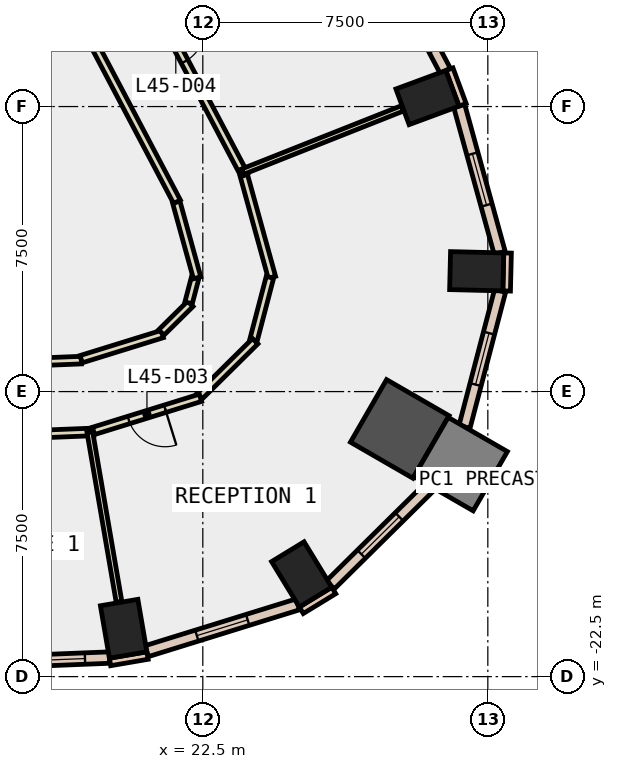
"""IFC4 building model, lengths in metres.
Left out: names, types, materials, properties, quantities, classifications, styles, units other than length and angle.
Written with IfcOpenShell. Run it as: python <this file> out.ifc"""

import sys

from ifc_helpers import new_model, si_unit, direction, frame, frame_2d, origin, origin_2d, place, context, subcontext, project, spatial, rectangle, extrude, element, fill, save


model = new_model("IFC4")
c1 = context("Model", 3, precision=1e-05, world=origin(), true_north=direction((0.0, 1.0)))
c2 = subcontext(c1, "Body", "Model", "MODEL_VIEW")
j1 = project(units=[si_unit("LENGTHUNIT", "METRE"), si_unit("PLANEANGLEUNIT", "RADIAN")], contexts=[c1])
p1 = place(None, origin())
s1 = spatial("IfcSite", under=j1, at=p1, CompositionType="ELEMENT")
p2 = place(p1, origin())
s2 = spatial("IfcBuilding", under=s1, at=p2, CompositionType="ELEMENT")
p3 = place(p2, frame((0.0, 0.0, 202.4)))
s3 = spatial("IfcBuildingStorey", under=s2, at=p3, CompositionType="ELEMENT", Elevation=202.4)
for number, where, z_axis, x_axis in (
    (1, (20.417, -21.241, -0.4), (0.0, 0.0, 1.0), (0.986, 0.169, 0.0)),
    (2, (25.102, -19.811, -0.4), (0.0, 0.0, 1.0), (0.853, 0.521, 0.0)),
):
    element("IfcColumn", number, at=place(p3, frame(where, z_axis=z_axis, x_axis=x_axis)), inside=s3, PredefinedType="COLUMN", context=c2, shape_type="SweptSolid", body=[
        extrude(rectangle(XDim=1.0, YDim=1.4, at=origin_2d()), origin(), (0.0, 0.0, 1.0), 4.2),
    ])
p4 = place(p3, frame((27.683, -15.983, -0.4), z_axis=(0.0, 0.0, 1.0), x_axis=(-0.866025403784, 0.5, 0.0)))
e3 = element("IfcColumn", 3, at=p4, inside=s3, PredefinedType="COLUMN", context=c2, shape_type="SweptSolid", body=[
    extrude(rectangle(XDim=1.9, YDim=1.9, at=origin_2d()), origin(), (0.0, 0.0, 1.0), 4.2),
])
for number, where, z_axis, x_axis in (
    (4, (29.707, -11.834, -0.4), (0.0, 0.0, 1.0), (0.025, 1.0, 0.0)),
    (5, (28.412, -7.264, -0.4), (0.0, 0.0, 1.0), (-0.347, 0.938, 0.0)),
):
    element("IfcColumn", number, at=place(p3, frame(where, z_axis=z_axis, x_axis=x_axis)), inside=s3, PredefinedType="COLUMN", context=c2, shape_type="SweptSolid", body=[
        extrude(rectangle(XDim=1.0, YDim=1.4, at=origin_2d()), origin(), (0.0, 0.0, 1.0), 4.2),
    ])
p5 = place(p3, frame((29.285, -16.908, -0.4), z_axis=(0.0, 0.0, 1.0), x_axis=(-0.866025403784, 0.5, 0.0)))
e6 = element("IfcColumn", 6, at=p5, inside=s3, PredefinedType="COLUMN", context=c2, shape_type="SweptSolid", body=[
    extrude(rectangle(XDim=1.8, YDim=1.8, at=origin_2d()), origin(), (0.0, 0.0, 1.0), 4.2),
])
p6 = place(p3, frame((29.336, -7.456, 0.0), z_axis=(0.0, 0.0, 1.0), x_axis=(-0.346892928577, 0.937904737222, 0.0)))
e7 = element("IfcWall", 7, at=p6, inside=s3, PredefinedType="STANDARD", context=c2, shape_type="SweptSolid", body=[
    extrude(rectangle(XDim=1.0, YDim=0.2, at=frame_2d((0.5, 0.0))), origin(), (0.0, 0.0, 1.0), 3.8),
])
p7 = place(p3, frame((20.059, -22.114, 0.0), z_axis=(0.0, 0.0, 1.0), x_axis=(0.985631544579, 0.168909615862, 0.0)))
e8 = element("IfcWall", 8, at=p7, inside=s3, PredefinedType="STANDARD", context=c2, shape_type="SweptSolid", body=[
    extrude(rectangle(XDim=1.0, YDim=0.2, at=frame_2d((0.5, 0.0))), origin(), (0.0, 0.0, 1.0), 3.8),
])
p8 = place(p3, frame((25.092, -20.754, 0.0), z_axis=(0.0, 0.0, 1.0), x_axis=(0.853679739553, 0.520798331677, 0.0)))
e9 = element("IfcWall", 9, at=p8, inside=s3, PredefinedType="STANDARD", context=c2, shape_type="SweptSolid", body=[
    extrude(rectangle(XDim=1.0, YDim=0.2, at=frame_2d((0.5, 0.0))), origin(), (0.0, 0.0, 1.0), 3.8),
])
p9 = place(p3, frame((30.495, -12.353, 0.0), z_axis=(0.0, 0.0, 1.0), x_axis=(0.023942303888, 0.999713341956, 0.0)))
e10 = element("IfcWall", 10, at=p9, inside=s3, PredefinedType="STANDARD", context=c2, shape_type="SweptSolid", body=[
    extrude(rectangle(XDim=0.999, YDim=0.2, at=frame_2d((0.5, 0.0))), origin(), (0.0, 0.0, 1.0), 3.8),
])
p10 = place(p3, frame((14.679, -22.213, 0.0), z_axis=(0.0, 0.0, 1.0), x_axis=(0.999205241612, 0.039860822062, 0.0)))
e11 = element("IfcWall", 11, at=p10, inside=s3, PredefinedType="STANDARD", context=c2, shape_type="SweptSolid", body=[
    extrude(rectangle(XDim=5.365, YDim=0.3, at=frame_2d((2.683, 0.0))), origin(), (0.0, 0.0, 1.0), 3.8),
])
p11 = place(p10, frame((0.641, 0.0, 0.9)))
e12 = element("IfcOpeningElement", 12, at=p11, cuts=e11, PredefinedType="OPENING", context=c2, shape_type="SweptSolid", body=[
    extrude(rectangle(XDim=1.4, YDim=2.6, at=frame_2d((0.7, 1.3))), frame((0.0, 0.16, 0.0), z_axis=(0.0, -1.0, 0.0), x_axis=(1.0, 0.0, 0.0)), (0.0, 0.0, 1.0), 0.32),
])
p12 = place(p10, frame((3.324, 0.0, 0.9)))
e13 = element("IfcOpeningElement", 13, at=p12, cuts=e11, PredefinedType="OPENING", context=c2, shape_type="SweptSolid", body=[
    extrude(rectangle(XDim=1.4, YDim=2.6, at=frame_2d((0.7, 1.3))), frame((0.0, 0.16, 0.0), z_axis=(0.0, -1.0, 0.0), x_axis=(1.0, 0.0, 0.0)), (0.0, 0.0, 1.0), 0.32),
])
p13 = place(p3, frame((21.024, -21.83, 0.0), z_axis=(0.0, 0.0, 1.0), x_axis=(0.955247215067, 0.295808651171, 0.0)))
e14 = element("IfcWall", 14, at=p13, inside=s3, PredefinedType="STANDARD", context=c2, shape_type="SweptSolid", body=[
    extrude(rectangle(XDim=4.161, YDim=0.3, at=frame_2d((2.081, 0.0))), origin(), (0.0, 0.0, 1.0), 3.8),
])
p14 = place(p13, frame((1.381, 0.0, 0.9)))
e15 = element("IfcOpeningElement", 15, at=p14, cuts=e14, PredefinedType="OPENING", context=c2, shape_type="SweptSolid", body=[
    extrude(rectangle(XDim=1.4, YDim=2.6, at=frame_2d((0.7, 1.3))), frame((0.0, 0.16, 0.0), z_axis=(0.0, -1.0, 0.0), x_axis=(1.0, 0.0, 0.0)), (0.0, 0.0, 1.0), 0.32),
])
p15 = place(p3, frame((25.855, -20.087, 0.0), z_axis=(0.0, 0.0, 1.0), x_axis=(0.711316812334, 0.702871533419, 0.0)))
e16 = element("IfcWall", 16, at=p15, inside=s3, PredefinedType="STANDARD", context=c2, shape_type="SweptSolid", body=[
    extrude(rectangle(XDim=3.7, YDim=0.3, at=frame_2d((1.85, 0.0))), origin(), (0.0, 0.0, 1.0), 3.8),
])
p16 = place(p15, frame((1.15, 0.0, 0.9)))
e17 = element("IfcOpeningElement", 17, at=p16, cuts=e16, PredefinedType="OPENING", context=c2, shape_type="SweptSolid", body=[
    extrude(rectangle(XDim=1.4, YDim=2.6, at=frame_2d((0.7, 1.3))), frame((0.0, 0.16, 0.0), z_axis=(0.0, -1.0, 0.0), x_axis=(1.0, 0.0, 0.0)), (0.0, 0.0, 1.0), 0.32),
])
p17 = place(p3, frame((29.386, -15.928, 0.0), z_axis=(0.0, 0.0, 1.0), x_axis=(0.253200635583, 0.96741378848, 0.0)))
e18 = element("IfcWall", 18, at=p17, inside=s3, PredefinedType="STANDARD", context=c2, shape_type="SweptSolid", body=[
    extrude(rectangle(XDim=3.701, YDim=0.3, at=frame_2d((1.85, 0.0))), origin(), (0.0, 0.0, 1.0), 3.8),
])
p18 = place(p17, frame((1.15, 0.0, 0.9)))
e19 = element("IfcOpeningElement", 19, at=p18, cuts=e18, PredefinedType="OPENING", context=c2, shape_type="SweptSolid", body=[
    extrude(rectangle(XDim=1.4, YDim=2.6, at=frame_2d((0.7, 1.3))), frame((0.0, 0.16, 0.0), z_axis=(0.0, -1.0, 0.0), x_axis=(1.0, 0.0, 0.0)), (0.0, 0.0, 1.0), 0.32),
])
p19 = place(p3, frame((30.312, -11.35, 0.0), z_axis=(0.0, 0.0, 1.0), x_axis=(-0.265534577923, 0.96410133696, 0.0)))
e20 = element("IfcWall", 20, at=p19, inside=s3, PredefinedType="STANDARD", context=c2, shape_type="SweptSolid", body=[
    extrude(rectangle(XDim=4.007, YDim=0.3, at=frame_2d((2.003, 0.0))), origin(), (0.0, 0.0, 1.0), 3.8),
])
p20 = place(p19, frame((1.303, 0.0, 0.9)))
e21 = element("IfcOpeningElement", 21, at=p20, cuts=e20, PredefinedType="OPENING", context=c2, shape_type="SweptSolid", body=[
    extrude(rectangle(XDim=1.4, YDim=2.6, at=frame_2d((0.7, 1.3))), frame((0.0, 0.16, 0.0), z_axis=(0.0, -1.0, 0.0), x_axis=(1.0, 0.0, 0.0)), (0.0, 0.0, 1.0), 0.32),
])
p21 = place(p3, frame((28.879, -6.559, 0.0), z_axis=(0.0, 0.0, 1.0), x_axis=(-0.466789249342, 0.884368586449, 0.0)))
e22 = element("IfcWall", 22, at=p21, inside=s3, PredefinedType="STANDARD", context=c2, shape_type="SweptSolid", body=[
    extrude(rectangle(XDim=7.273, YDim=0.3, at=frame_2d((3.637, 0.0))), origin(), (0.0, 0.0, 1.0), 3.8),
])
p22 = place(p21, frame((0.618, 0.0, 0.9)))
e23 = element("IfcOpeningElement", 23, at=p22, cuts=e22, PredefinedType="OPENING", context=c2, shape_type="SweptSolid", body=[
    extrude(rectangle(XDim=2.4, YDim=2.6, at=frame_2d((1.2, 1.3))), frame((0.0, 0.16, 0.0), z_axis=(0.0, -1.0, 0.0), x_axis=(1.0, 0.0, 0.0)), (0.0, 0.0, 1.0), 0.32),
])
p23 = place(p21, frame((4.255, 0.0, 0.9)))
e24 = element("IfcOpeningElement", 24, at=p23, cuts=e22, PredefinedType="OPENING", context=c2, shape_type="SweptSolid", body=[
    extrude(rectangle(XDim=2.4, YDim=2.6, at=frame_2d((1.2, 1.3))), frame((0.0, 0.16, 0.0), z_axis=(0.0, -1.0, 0.0), x_axis=(1.0, 0.0, 0.0)), (0.0, 0.0, 1.0), 0.32),
])
p24 = place(p3, frame((13.925, -14.387, 0.0), z_axis=(0.0, 0.0, 1.0), x_axis=(0.999202986342, 0.039917315597, 0.0)))
e25 = element("IfcWall", 25, at=p24, inside=s3, PredefinedType="PARTITIONING", context=c2, shape_type="SweptSolid", body=[
    extrude(rectangle(XDim=5.382, YDim=0.2, at=frame_2d((2.691, 0.0))), origin(), (0.0, 0.0, 1.0), 3.8),
])
p25 = place(p3, frame((19.299, -14.147, 0.0), z_axis=(0.0, 0.0, 1.0), x_axis=(0.955241047187, 0.295828568211, 0.0)))
e26 = element("IfcWall", 26, at=p25, inside=s3, PredefinedType="PARTITIONING", context=c2, shape_type="SweptSolid", body=[
    extrude(rectangle(XDim=2.234, YDim=0.2, at=frame_2d((1.117, 0.0))), origin(), (0.0, 0.0, 1.0), 3.8),
])
p26 = place(p3, frame((21.408, -13.445, 0.0), z_axis=(0.0, 0.0, 1.0), x_axis=(0.711298443117, 0.702890122863, 0.0)))
e27 = element("IfcWall", 27, at=p26, inside=s3, PredefinedType="PARTITIONING", context=c2, shape_type="SweptSolid", body=[
    extrude(rectangle(XDim=1.074, YDim=0.2, at=frame_2d((0.537, 0.0))), origin(), (0.0, 0.0, 1.0), 3.8),
])
p27 = place(p3, frame((22.126, -12.664, 0.0), z_axis=(0.0, 0.0, 1.0), x_axis=(0.253079435581, 0.967445501972, 0.0)))
e28 = element("IfcWall", 28, at=p27, inside=s3, PredefinedType="PARTITIONING", context=c2, shape_type="SweptSolid", body=[
    extrude(rectangle(XDim=0.68, YDim=0.2, at=frame_2d((0.34, 0.0))), origin(), (0.0, 0.0, 1.0), 3.8),
])
p28 = place(p3, frame((22.35, -12.006, 0.0), z_axis=(0.0, 0.0, 1.0), x_axis=(-0.265584627827, 0.964087550725, 0.0)))
e29 = element("IfcWall", 29, at=p28, inside=s3, PredefinedType="PARTITIONING", context=c2, shape_type="SweptSolid", body=[
    extrude(rectangle(XDim=2.067, YDim=0.2, at=frame_2d((1.034, 0.0))), origin(), (0.0, 0.0, 1.0), 3.8),
])
p29 = place(p3, frame((21.821, -10.005, 0.0), z_axis=(0.0, 0.0, 1.0), x_axis=(-0.466770012358, 0.884378739887, 0.0)))
e30 = element("IfcWall", 30, at=p29, inside=s3, PredefinedType="PARTITIONING", context=c2, shape_type="SweptSolid", body=[
    extrude(rectangle(XDim=7.449, YDim=0.2, at=frame_2d((3.725, 0.0))), origin(), (0.0, 0.0, 1.0), 3.8),
])
p30 = place(p3, frame((19.627, -16.061, 0.0), z_axis=(0.0, 0.0, 1.0), x_axis=(-0.999206061563, -0.039840262741, 0.0)))
e31 = element("IfcWall", 31, at=p30, inside=s3, PredefinedType="PARTITIONING", context=c2, shape_type="SweptSolid", body=[
    extrude(rectangle(XDim=5.57, YDim=0.2, at=frame_2d((2.785, 0.0))), origin(), (0.0, 0.0, 1.0), 3.8),
])
p31 = place(p30, frame((2.36, 0.0, 0.0)))
e32 = element("IfcOpeningElement", 32, at=p31, cuts=e31, PredefinedType="OPENING", context=c2, shape_type="SweptSolid", body=[
    extrude(rectangle(XDim=1.0, YDim=2.1, at=frame_2d((0.5, 1.05))), frame((0.0, 0.11, 0.0), z_axis=(0.0, -1.0, 0.0), x_axis=(1.0, 0.0, 0.0)), (0.0, 0.0, 1.0), 0.22),
])
p32 = place(p3, frame((23.578, -9.309, 0.0), z_axis=(0.0, 0.0, 1.0), x_axis=(0.265884037198, -0.964005020092, 0.0)))
e33 = element("IfcWall", 33, at=p32, inside=s3, PredefinedType="PARTITIONING", context=c2, shape_type="SweptSolid", body=[
    extrude(rectangle(XDim=2.784, YDim=0.2, at=frame_2d((1.392, 0.0))), origin(), (0.0, 0.0, 1.0), 3.8),
])
p33 = place(p3, frame((24.266, -11.993, 0.0), z_axis=(0.0, 0.0, 1.0), x_axis=(-0.253025690571, -0.967459559832, 0.0)))
e34 = element("IfcWall", 34, at=p33, inside=s3, PredefinedType="PARTITIONING", context=c2, shape_type="SweptSolid", body=[
    extrude(rectangle(XDim=1.712, YDim=0.2, at=frame_2d((0.856, 0.0))), origin(), (0.0, 0.0, 1.0), 3.8),
])
p34 = place(p3, frame((23.878, -13.675, 0.0), z_axis=(0.0, 0.0, 1.0), x_axis=(-0.710949827962, -0.703242733429, 0.0)))
e35 = element("IfcWall", 35, at=p34, inside=s3, PredefinedType="PARTITIONING", context=c2, shape_type="SweptSolid", body=[
    extrude(rectangle(XDim=2.059, YDim=0.2, at=frame_2d((1.03, 0.0))), origin(), (0.0, 0.0, 1.0), 3.8),
])
p35 = place(p3, frame((22.438, -15.163, 0.0), z_axis=(0.0, 0.0, 1.0), x_axis=(-0.955234616163, -0.295849333419, 0.0)))
e36 = element("IfcWall", 36, at=p35, inside=s3, PredefinedType="PARTITIONING", context=c2, shape_type="SweptSolid", body=[
    extrude(rectangle(XDim=2.947, YDim=0.2, at=frame_2d((1.473, 0.0))), origin(), (0.0, 0.0, 1.0), 3.8),
])
p36 = place(p35, frame((0.974, 0.0, 0.0)))
e37 = element("IfcOpeningElement", 37, at=p36, cuts=e36, PredefinedType="OPENING", context=c2, shape_type="SweptSolid", body=[
    extrude(rectangle(XDim=1.0, YDim=2.1, at=frame_2d((0.5, 1.05))), frame((0.0, 0.11, 0.0), z_axis=(0.0, -1.0, 0.0), x_axis=(1.0, 0.0, 0.0)), (0.0, 0.0, 1.0), 0.22),
])
p37 = place(p3, frame((19.98, -2.448, 0.0), z_axis=(0.0, 0.0, 1.0), x_axis=(0.466864023915, -0.884329114738, 0.0)))
e38 = element("IfcWall", 38, at=p37, inside=s3, PredefinedType="PARTITIONING", context=c2, shape_type="SweptSolid", body=[
    extrude(rectangle(XDim=7.75, YDim=0.2, at=frame_2d((3.875, 0.0))), origin(), (0.0, 0.0, 1.0), 3.8),
])
p38 = place(p37, frame((3.375, 0.0, 0.0)))
e39 = element("IfcOpeningElement", 39, at=p38, cuts=e38, PredefinedType="OPENING", context=c2, shape_type="SweptSolid", body=[
    extrude(rectangle(XDim=1.0, YDim=2.1, at=frame_2d((0.5, 1.05))), frame((0.0, 0.11, 0.0), z_axis=(0.0, -1.0, 0.0), x_axis=(1.0, 0.0, 0.0)), (0.0, 0.0, 1.0), 0.22),
])
p39 = place(p3, frame((19.527, -16.065, 0.0), z_axis=(0.0, 0.0, 1.0), x_axis=(0.169437821314, -0.985540879268, 0.0)))
e40 = element("IfcWall", 40, at=p39, inside=s3, PredefinedType="PARTITIONING", context=c2, shape_type="SweptSolid", body=[
    extrude(rectangle(XDim=4.531, YDim=0.15, at=frame_2d((2.266, 0.0))), origin(), (0.0, 0.0, 1.0), 3.8),
])
p40 = place(p3, frame((23.552, -9.212, 0.0), z_axis=(0.0, 0.0, 1.0), x_axis=(0.929720624715, 0.368265610639, 0.0)))
e41 = element("IfcWall", 41, at=p40, inside=s3, PredefinedType="PARTITIONING", context=c2, shape_type="SweptSolid", body=[
    extrude(rectangle(XDim=4.515, YDim=0.15, at=frame_2d((2.258, 0.0))), origin(), (0.0, 0.0, 1.0), 3.8),
])
p41 = place(p12, origin())
e42 = element("IfcWindow", 42, at=p41, inside=s3, PartitioningType="SINGLE_PANEL", PredefinedType="WINDOW", context=c2, shape_type="SweptSolid", body=[
    extrude(rectangle(XDim=1.4, YDim=2.6, at=frame_2d((0.7, 1.3))), frame((0.0, 0.03, 0.0), z_axis=(0.0, -1.0, 0.0), x_axis=(1.0, 0.0, 0.0)), (0.0, 0.0, 1.0), 0.06),
])
fill(e13, e42)
p42 = place(p14, origin())
e43 = element("IfcWindow", 43, at=p42, inside=s3, PartitioningType="SINGLE_PANEL", PredefinedType="WINDOW", context=c2, shape_type="SweptSolid", body=[
    extrude(rectangle(XDim=1.4, YDim=2.6, at=frame_2d((0.7, 1.3))), frame((0.0, 0.03, 0.0), z_axis=(0.0, -1.0, 0.0), x_axis=(1.0, 0.0, 0.0)), (0.0, 0.0, 1.0), 0.06),
])
fill(e15, e43)
p43 = place(p16, origin())
e44 = element("IfcWindow", 44, at=p43, inside=s3, PartitioningType="SINGLE_PANEL", PredefinedType="WINDOW", context=c2, shape_type="SweptSolid", body=[
    extrude(rectangle(XDim=1.4, YDim=2.6, at=frame_2d((0.7, 1.3))), frame((0.0, 0.03, 0.0), z_axis=(0.0, -1.0, 0.0), x_axis=(1.0, 0.0, 0.0)), (0.0, 0.0, 1.0), 0.06),
])
fill(e17, e44)
p44 = place(p18, origin())
e45 = element("IfcWindow", 45, at=p44, inside=s3, PartitioningType="SINGLE_PANEL", PredefinedType="WINDOW", context=c2, shape_type="SweptSolid", body=[
    extrude(rectangle(XDim=1.4, YDim=2.6, at=frame_2d((0.7, 1.3))), frame((0.0, 0.03, 0.0), z_axis=(0.0, -1.0, 0.0), x_axis=(1.0, 0.0, 0.0)), (0.0, 0.0, 1.0), 0.06),
])
fill(e19, e45)
p45 = place(p20, origin())
e46 = element("IfcWindow", 46, at=p45, inside=s3, PartitioningType="SINGLE_PANEL", PredefinedType="WINDOW", context=c2, shape_type="SweptSolid", body=[
    extrude(rectangle(XDim=1.4, YDim=2.6, at=frame_2d((0.7, 1.3))), frame((0.0, 0.03, 0.0), z_axis=(0.0, -1.0, 0.0), x_axis=(1.0, 0.0, 0.0)), (0.0, 0.0, 1.0), 0.06),
])
fill(e21, e46)
p46 = place(p36, origin())
e47 = element("IfcDoor", 47, at=p46, inside=s3, OperationType="SINGLE_SWING_LEFT", PredefinedType="DOOR", context=c2, shape_type="SweptSolid", body=[
    extrude(rectangle(XDim=1.0, YDim=2.1, at=frame_2d((0.5, 1.05))), frame((0.0, 0.025, 0.0), z_axis=(0.0, -1.0, 0.0), x_axis=(1.0, 0.0, 0.0)), (0.0, 0.0, 1.0), 0.05),
])
fill(e37, e47)
p47 = place(p38, origin())
e48 = element("IfcDoor", 48, at=p47, inside=s3, OperationType="SINGLE_SWING_LEFT", PredefinedType="DOOR", context=c2, shape_type="SweptSolid", body=[
    extrude(rectangle(XDim=1.0, YDim=2.1, at=frame_2d((0.5, 1.05))), frame((0.0, 0.025, 0.0), z_axis=(0.0, -1.0, 0.0), x_axis=(1.0, 0.0, 0.0)), (0.0, 0.0, 1.0), 0.05),
])
fill(e39, e48)
save(model, sys.argv[1])
